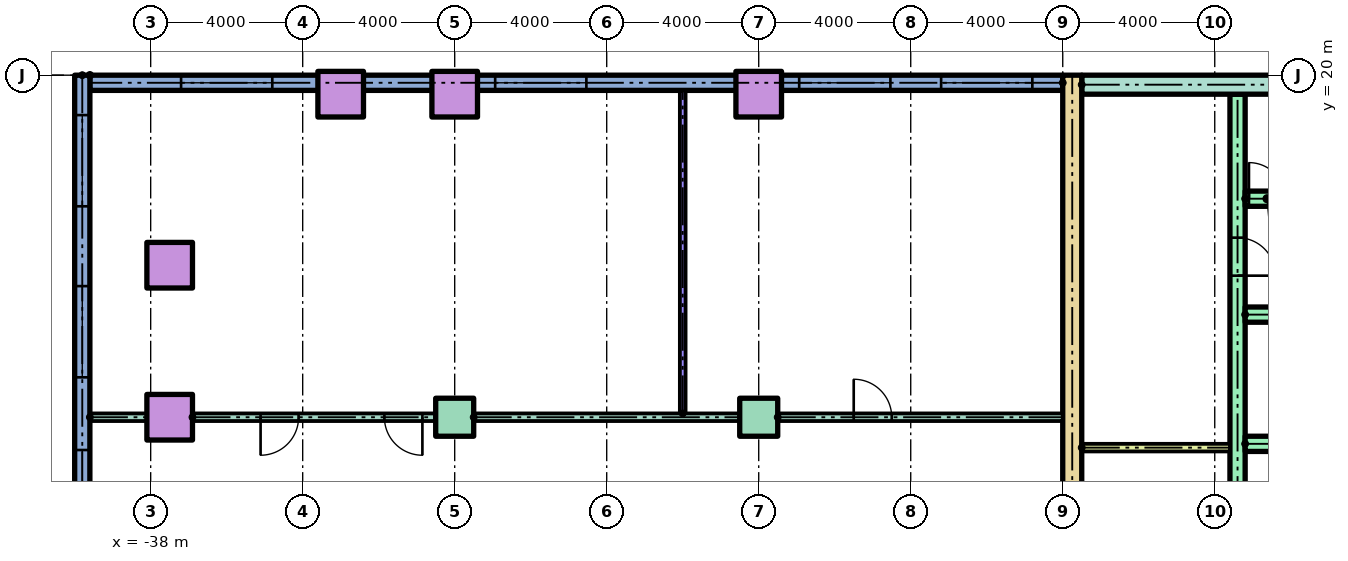
"""IFC4 building model, lengths in metres.
Left out: names, types, materials, properties, quantities, classifications, styles, units other than length and angle.
Written with IfcOpenShell. Run it as: python <this file> out.ifc"""

import sys

from ifc_helpers import new_model, si_unit, direction, frame, frame_2d, origin, origin_2d, place, context, subcontext, project, spatial, rectangle, hollow_rectangle, extrude, element, fill, save


model = new_model("IFC4")
c1 = context("Model", 3, precision=1e-05, world=origin(), true_north=direction((0.0, 1.0)))
c2 = subcontext(c1, "Body", "Model", "MODEL_VIEW")
j1 = project(units=[si_unit("LENGTHUNIT", "METRE"), si_unit("PLANEANGLEUNIT", "RADIAN")], contexts=[c1])
p1 = place(None, origin())
s1 = spatial("IfcSite", under=j1, at=p1, CompositionType="ELEMENT")
p2 = place(p1, origin())
s2 = spatial("IfcBuilding", under=s1, at=p2, CompositionType="ELEMENT")
p3 = place(p2, frame((0.0, 0.0, 6.0)))
s3 = spatial("IfcBuildingStorey", under=s2, at=p3, CompositionType="ELEMENT", Elevation=6.0)
p4 = place(p3, frame((-37.5, 11.0, 0.0)))
e1 = element("IfcColumn", 1, at=p4, inside=s3, PredefinedType="COLUMN", context=c2, shape_type="SweptSolid", body=[
    extrude(hollow_rectangle(XDim=1.2, YDim=1.2, WallThickness=0.06, at=origin_2d()), origin(), (0.0, 0.0, 1.0), 4.0),
])
for number, where in (
    (2, (-30.0, 11.0, 0.0)),
    (3, (-22.0, 11.0, 0.0)),
):
    element("IfcColumn", number, at=place(p3, frame(where)), inside=s3, PredefinedType="COLUMN", context=c2, shape_type="SweptSolid", body=[
        extrude(rectangle(XDim=1.0, YDim=1.0, at=origin_2d()), origin(), (0.0, 0.0, 1.0), 4.0),
    ])
for number, where in (
    (4, (-37.5, 15.0, 0.0)),
    (5, (-33.0, 19.5, 0.0)),
    (6, (-30.0, 19.5, 0.0)),
    (7, (-22.0, 19.5, 0.0)),
):
    element("IfcColumn", number, at=place(p3, frame(where)), inside=s3, PredefinedType="COLUMN", context=c2, shape_type="SweptSolid", body=[
        extrude(hollow_rectangle(XDim=1.2, YDim=1.2, WallThickness=0.06, at=origin_2d()), origin(), (0.0, 0.0, 1.0), 4.0),
    ])
p5 = place(p3, frame((-14.0, 19.8, 0.0), z_axis=(0.0, 0.0, 1.0), x_axis=(-1.0, 0.0, 0.0)))
e8 = element("IfcWall", 8, at=p5, inside=s3, PredefinedType="STANDARD", context=c2, shape_type="SweptSolid", body=[
    extrude(rectangle(XDim=25.6, YDim=0.4, at=frame_2d((12.8, 0.0))), origin(), (0.0, 0.0, 1.0), 3.7),
])
p6 = place(p5, frame((0.8, 0.0, 0.9)))
e9 = element("IfcOpeningElement", 9, at=p6, cuts=e8, PredefinedType="OPENING", context=c2, shape_type="SweptSolid", body=[
    extrude(rectangle(XDim=2.4, YDim=2.1, at=frame_2d((1.2, 1.05))), frame((0.0, 0.21, 0.0), z_axis=(0.0, -1.0, 0.0), x_axis=(1.0, 0.0, 0.0)), (0.0, 0.0, 1.0), 0.42),
])
p7 = place(p5, frame((4.535, 0.0, 0.9)))
e10 = element("IfcOpeningElement", 10, at=p7, cuts=e8, PredefinedType="OPENING", context=c2, shape_type="SweptSolid", body=[
    extrude(rectangle(XDim=2.4, YDim=2.1, at=frame_2d((1.2, 1.05))), frame((0.0, 0.21, 0.0), z_axis=(0.0, -1.0, 0.0), x_axis=(1.0, 0.0, 0.0)), (0.0, 0.0, 1.0), 0.42),
])
p8 = place(p5, frame((12.535, 0.0, 0.9)))
e11 = element("IfcOpeningElement", 11, at=p8, cuts=e8, PredefinedType="OPENING", context=c2, shape_type="SweptSolid", body=[
    extrude(rectangle(XDim=2.4, YDim=2.1, at=frame_2d((1.2, 1.05))), frame((0.0, 0.21, 0.0), z_axis=(0.0, -1.0, 0.0), x_axis=(1.0, 0.0, 0.0)), (0.0, 0.0, 1.0), 0.42),
])
p9 = place(p5, frame((20.8, 0.0, 0.9)))
e12 = element("IfcOpeningElement", 12, at=p9, cuts=e8, PredefinedType="OPENING", context=c2, shape_type="SweptSolid", body=[
    extrude(rectangle(XDim=2.4, YDim=2.1, at=frame_2d((1.2, 1.05))), frame((0.0, 0.21, 0.0), z_axis=(0.0, -1.0, 0.0), x_axis=(1.0, 0.0, 0.0)), (0.0, 0.0, 1.0), 0.42),
])
p10 = place(p3, frame((-39.8, 20.0, 0.0), z_axis=(0.0, 0.0, 1.0), x_axis=(0.0, -1.0, 0.0)))
e13 = element("IfcWall", 13, at=p10, inside=s3, PredefinedType="STANDARD", context=c2, shape_type="SweptSolid", body=[
    extrude(rectangle(XDim=70.0, YDim=0.4, at=frame_2d((35.0, 0.0))), origin(), (0.0, 0.0, 1.0), 3.7),
])
p11 = place(p10, frame((1.05, 0.0, 0.9)))
e14 = element("IfcOpeningElement", 14, at=p11, cuts=e13, PredefinedType="OPENING", context=c2, shape_type="SweptSolid", body=[
    extrude(rectangle(XDim=2.4, YDim=2.1, at=frame_2d((1.2, 1.05))), frame((0.0, 0.21, 0.0), z_axis=(0.0, -1.0, 0.0), x_axis=(1.0, 0.0, 0.0)), (0.0, 0.0, 1.0), 0.42),
])
p12 = place(p10, frame((5.55, 0.0, 0.9)))
e15 = element("IfcOpeningElement", 15, at=p12, cuts=e13, PredefinedType="OPENING", context=c2, shape_type="SweptSolid", body=[
    extrude(rectangle(XDim=2.4, YDim=2.1, at=frame_2d((1.2, 1.05))), frame((0.0, 0.21, 0.0), z_axis=(0.0, -1.0, 0.0), x_axis=(1.0, 0.0, 0.0)), (0.0, 0.0, 1.0), 0.42),
])
p13 = place(p10, frame((9.863, 0.0, 0.9)))
e16 = element("IfcOpeningElement", 16, at=p13, cuts=e13, PredefinedType="OPENING", context=c2, shape_type="SweptSolid", body=[
    extrude(rectangle(XDim=2.4, YDim=2.1, at=frame_2d((1.2, 1.05))), frame((0.0, 0.21, 0.0), z_axis=(0.0, -1.0, 0.0), x_axis=(1.0, 0.0, 0.0)), (0.0, 0.0, 1.0), 0.42),
])
p14 = place(p10, frame((13.988, 0.0, 0.9)))
e17 = element("IfcOpeningElement", 17, at=p14, cuts=e13, PredefinedType="OPENING", context=c2, shape_type="SweptSolid", body=[
    extrude(rectangle(XDim=2.4, YDim=2.1, at=frame_2d((1.2, 1.05))), frame((0.0, 0.21, 0.0), z_axis=(0.0, -1.0, 0.0), x_axis=(1.0, 0.0, 0.0)), (0.0, 0.0, 1.0), 0.42),
])
p15 = place(p10, frame((18.113, 0.0, 0.9)))
e18 = element("IfcOpeningElement", 18, at=p15, cuts=e13, PredefinedType="OPENING", context=c2, shape_type="SweptSolid", body=[
    extrude(rectangle(XDim=2.4, YDim=2.1, at=frame_2d((1.2, 1.05))), frame((0.0, 0.21, 0.0), z_axis=(0.0, -1.0, 0.0), x_axis=(1.0, 0.0, 0.0)), (0.0, 0.0, 1.0), 0.42),
])
p16 = place(p10, frame((22.238, 0.0, 0.9)))
e19 = element("IfcOpeningElement", 19, at=p16, cuts=e13, PredefinedType="OPENING", context=c2, shape_type="SweptSolid", body=[
    extrude(rectangle(XDim=2.4, YDim=2.1, at=frame_2d((1.2, 1.05))), frame((0.0, 0.21, 0.0), z_axis=(0.0, -1.0, 0.0), x_axis=(1.0, 0.0, 0.0)), (0.0, 0.0, 1.0), 0.42),
])
p17 = place(p10, frame((26.363, 0.0, 0.9)))
e20 = element("IfcOpeningElement", 20, at=p17, cuts=e13, PredefinedType="OPENING", context=c2, shape_type="SweptSolid", body=[
    extrude(rectangle(XDim=2.4, YDim=2.1, at=frame_2d((1.2, 1.05))), frame((0.0, 0.21, 0.0), z_axis=(0.0, -1.0, 0.0), x_axis=(1.0, 0.0, 0.0)), (0.0, 0.0, 1.0), 0.42),
])
p18 = place(p10, frame((30.488, 0.0, 0.9)))
e21 = element("IfcOpeningElement", 21, at=p18, cuts=e13, PredefinedType="OPENING", context=c2, shape_type="SweptSolid", body=[
    extrude(rectangle(XDim=2.4, YDim=2.1, at=frame_2d((1.2, 1.05))), frame((0.0, 0.21, 0.0), z_axis=(0.0, -1.0, 0.0), x_axis=(1.0, 0.0, 0.0)), (0.0, 0.0, 1.0), 0.42),
])
p19 = place(p10, frame((34.613, 0.0, 0.9)))
e22 = element("IfcOpeningElement", 22, at=p19, cuts=e13, PredefinedType="OPENING", context=c2, shape_type="SweptSolid", body=[
    extrude(rectangle(XDim=2.4, YDim=2.1, at=frame_2d((1.2, 1.05))), frame((0.0, 0.21, 0.0), z_axis=(0.0, -1.0, 0.0), x_axis=(1.0, 0.0, 0.0)), (0.0, 0.0, 1.0), 0.42),
])
p20 = place(p10, frame((38.738, 0.0, 0.9)))
e23 = element("IfcOpeningElement", 23, at=p20, cuts=e13, PredefinedType="OPENING", context=c2, shape_type="SweptSolid", body=[
    extrude(rectangle(XDim=2.4, YDim=2.1, at=frame_2d((1.2, 1.05))), frame((0.0, 0.21, 0.0), z_axis=(0.0, -1.0, 0.0), x_axis=(1.0, 0.0, 0.0)), (0.0, 0.0, 1.0), 0.42),
])
p21 = place(p10, frame((53.633, 0.0, 0.9)))
e24 = element("IfcOpeningElement", 24, at=p21, cuts=e13, PredefinedType="OPENING", context=c2, shape_type="SweptSolid", body=[
    extrude(rectangle(XDim=2.4, YDim=2.1, at=frame_2d((1.2, 1.05))), frame((0.0, 0.21, 0.0), z_axis=(0.0, -1.0, 0.0), x_axis=(1.0, 0.0, 0.0)), (0.0, 0.0, 1.0), 0.42),
])
p22 = place(p10, frame((57.3, 0.0, 0.9)))
e25 = element("IfcOpeningElement", 25, at=p22, cuts=e13, PredefinedType="OPENING", context=c2, shape_type="SweptSolid", body=[
    extrude(rectangle(XDim=2.4, YDim=2.1, at=frame_2d((1.2, 1.05))), frame((0.0, 0.21, 0.0), z_axis=(0.0, -1.0, 0.0), x_axis=(1.0, 0.0, 0.0)), (0.0, 0.0, 1.0), 0.42),
])
p23 = place(p10, frame((60.967, 0.0, 0.9)))
e26 = element("IfcOpeningElement", 26, at=p23, cuts=e13, PredefinedType="OPENING", context=c2, shape_type="SweptSolid", body=[
    extrude(rectangle(XDim=2.4, YDim=2.1, at=frame_2d((1.2, 1.05))), frame((0.0, 0.21, 0.0), z_axis=(0.0, -1.0, 0.0), x_axis=(1.0, 0.0, 0.0)), (0.0, 0.0, 1.0), 0.42),
])
p24 = place(p10, frame((66.85, 0.0, 0.9)))
e27 = element("IfcOpeningElement", 27, at=p24, cuts=e13, PredefinedType="OPENING", context=c2, shape_type="SweptSolid", body=[
    extrude(rectangle(XDim=2.4, YDim=2.1, at=frame_2d((1.2, 1.05))), frame((0.0, 0.21, 0.0), z_axis=(0.0, -1.0, 0.0), x_axis=(1.0, 0.0, 0.0)), (0.0, 0.0, 1.0), 0.42),
])
p25 = place(p3, frame((-13.75, 3.0, 0.0), z_axis=(0.0, 0.0, 1.0), x_axis=(0.0, 1.0, 0.0)))
e28 = element("IfcWall", 28, at=p25, inside=s3, PredefinedType="SHEAR", context=c2, shape_type="SweptSolid", body=[
    extrude(rectangle(XDim=17.0, YDim=0.5, at=frame_2d((8.5, 0.0))), origin(), (0.0, 0.0, 1.0), 3.7),
])
p26 = place(p3, frame((-13.5, 19.75, 0.0)))
e29 = element("IfcWall", 29, at=p26, inside=s3, PredefinedType="SHEAR", context=c2, shape_type="SweptSolid", body=[
    extrude(rectangle(XDim=27.0, YDim=0.5, at=frame_2d((13.5, 0.0))), origin(), (0.0, 0.0, 1.0), 3.7),
])
p27 = place(p3, frame((-9.4, 6.8, 0.0), z_axis=(0.0, 0.0, 1.0), x_axis=(0.0, 1.0, 0.0)))
e30 = element("IfcWall", 30, at=p27, inside=s3, PredefinedType="SHEAR", context=c2, shape_type="SweptSolid", body=[
    extrude(rectangle(XDim=12.7, YDim=0.4, at=frame_2d((6.35, 0.0))), origin(), (0.0, 0.0, 1.0), 3.7),
])
p28 = place(p27, frame((1.15, 0.0, 0.0)))
e31 = element("IfcOpeningElement", 31, at=p28, cuts=e30, PredefinedType="OPENING", context=c2, shape_type="SweptSolid", body=[
    extrude(rectangle(XDim=1.0, YDim=2.1, at=frame_2d((0.5, 1.05))), frame((0.0, 0.21, 0.0), z_axis=(0.0, -1.0, 0.0), x_axis=(1.0, 0.0, 0.0)), (0.0, 0.0, 1.0), 0.42),
])
p29 = place(p27, frame((7.925, 0.0, 0.0)))
e32 = element("IfcOpeningElement", 32, at=p29, cuts=e30, PredefinedType="OPENING", context=c2, shape_type="SweptSolid", body=[
    extrude(rectangle(XDim=1.0, YDim=2.1, at=frame_2d((0.5, 1.05))), frame((0.0, 0.21, 0.0), z_axis=(0.0, -1.0, 0.0), x_axis=(1.0, 0.0, 0.0)), (0.0, 0.0, 1.0), 0.42),
])
p30 = place(p3, frame((-9.2, 10.3, 0.0)))
e33 = element("IfcWall", 33, at=p30, inside=s3, PredefinedType="SHEAR", context=c2, shape_type="SweptSolid", body=[
    extrude(rectangle(XDim=8.0, YDim=0.4, at=frame_2d((4.0, 0.0))), origin(), (0.0, 0.0, 1.0), 3.7),
])
p31 = place(p30, frame((2.033, 0.0, 0.0)))
e34 = element("IfcOpeningElement", 34, at=p31, cuts=e33, PredefinedType="OPENING", context=c2, shape_type="SweptSolid", body=[
    extrude(rectangle(XDim=1.0, YDim=2.1, at=frame_2d((0.5, 1.05))), frame((0.0, 0.21, 0.0), z_axis=(0.0, -1.0, 0.0), x_axis=(1.0, 0.0, 0.0)), (0.0, 0.0, 1.0), 0.42),
])
p32 = place(p30, frame((6.133, 0.0, 0.0)))
e35 = element("IfcOpeningElement", 35, at=p32, cuts=e33, PredefinedType="OPENING", context=c2, shape_type="SweptSolid", body=[
    extrude(rectangle(XDim=1.0, YDim=2.1, at=frame_2d((0.5, 1.05))), frame((0.0, 0.21, 0.0), z_axis=(0.0, -1.0, 0.0), x_axis=(1.0, 0.0, 0.0)), (0.0, 0.0, 1.0), 0.42),
])
p33 = place(p3, frame((-9.2, 13.7, 0.0)))
e36 = element("IfcWall", 36, at=p33, inside=s3, PredefinedType="SHEAR", context=c2, shape_type="SweptSolid", body=[
    extrude(rectangle(XDim=8.0, YDim=0.4, at=frame_2d((4.0, 0.0))), origin(), (0.0, 0.0, 1.0), 3.7),
])
p34 = place(p3, frame((-9.2, 16.75, 0.0)))
e37 = element("IfcWall", 37, at=p34, inside=s3, PredefinedType="SHEAR", context=c2, shape_type="SweptSolid", body=[
    extrude(rectangle(XDim=18.4, YDim=0.4, at=frame_2d((9.2, 0.0))), origin(), (0.0, 0.0, 1.0), 3.7),
])
p35 = place(p34, frame((0.1, 0.0, 0.0)))
e38 = element("IfcOpeningElement", 38, at=p35, cuts=e37, PredefinedType="OPENING", context=c2, shape_type="SweptSolid", body=[
    extrude(rectangle(XDim=0.95, YDim=2.1, at=frame_2d((0.475, 1.05))), frame((0.0, 0.21, 0.0), z_axis=(0.0, -1.0, 0.0), x_axis=(1.0, 0.0, 0.0)), (0.0, 0.0, 1.0), 0.42),
])
p36 = place(p34, frame((6.1, 0.0, 0.0)))
e39 = element("IfcOpeningElement", 39, at=p36, cuts=e37, PredefinedType="OPENING", context=c2, shape_type="SweptSolid", body=[
    extrude(rectangle(XDim=0.95, YDim=2.1, at=frame_2d((0.475, 1.05))), frame((0.0, 0.21, 0.0), z_axis=(0.0, -1.0, 0.0), x_axis=(1.0, 0.0, 0.0)), (0.0, 0.0, 1.0), 0.42),
])
p37 = place(p34, frame((12.1, 0.0, 0.0)))
e40 = element("IfcOpeningElement", 40, at=p37, cuts=e37, PredefinedType="OPENING", context=c2, shape_type="SweptSolid", body=[
    extrude(rectangle(XDim=0.95, YDim=2.1, at=frame_2d((0.475, 1.05))), frame((0.0, 0.21, 0.0), z_axis=(0.0, -1.0, 0.0), x_axis=(1.0, 0.0, 0.0)), (0.0, 0.0, 1.0), 0.42),
])
p38 = place(p3, frame((-13.5, 10.2, 0.0)))
e41 = element("IfcWall", 41, at=p38, inside=s3, PredefinedType="PARTITIONING", context=c2, shape_type="SweptSolid", body=[
    extrude(rectangle(XDim=3.9, YDim=0.2, at=frame_2d((1.95, 0.0))), origin(), (0.0, 0.0, 1.0), 3.7),
])
p39 = place(p3, frame((-39.6, 11.0, 0.0)))
e42 = element("IfcWall", 42, at=p39, inside=s3, PredefinedType="PARTITIONING", context=c2, shape_type="SweptSolid", body=[
    extrude(rectangle(XDim=1.5, YDim=0.2, at=frame_2d((0.75, 0.0))), origin(), (0.0, 0.0, 1.0), 3.7),
])
p40 = place(p3, frame((-36.9, 11.0, 0.0)))
e43 = element("IfcWall", 43, at=p40, inside=s3, PredefinedType="PARTITIONING", context=c2, shape_type="SweptSolid", body=[
    extrude(rectangle(XDim=6.4, YDim=0.2, at=frame_2d((3.2, 0.0))), origin(), (0.0, 0.0, 1.0), 3.7),
])
p41 = place(p40, frame((1.792, 0.0, 0.0)))
e44 = element("IfcOpeningElement", 44, at=p41, cuts=e43, PredefinedType="OPENING", context=c2, shape_type="SweptSolid", body=[
    extrude(rectangle(XDim=1.0, YDim=2.1, at=frame_2d((0.5, 1.05))), frame((0.0, 0.11, 0.0), z_axis=(0.0, -1.0, 0.0), x_axis=(1.0, 0.0, 0.0)), (0.0, 0.0, 1.0), 0.22),
])
p42 = place(p40, frame((5.05, 0.0, 0.0)))
e45 = element("IfcOpeningElement", 45, at=p42, cuts=e43, PredefinedType="OPENING", context=c2, shape_type="SweptSolid", body=[
    extrude(rectangle(XDim=1.0, YDim=2.1, at=frame_2d((0.5, 1.05))), frame((0.0, 0.11, 0.0), z_axis=(0.0, -1.0, 0.0), x_axis=(1.0, 0.0, 0.0)), (0.0, 0.0, 1.0), 0.22),
])
p43 = place(p3, frame((-29.5, 11.0, 0.0)))
e46 = element("IfcWall", 46, at=p43, inside=s3, PredefinedType="PARTITIONING", context=c2, shape_type="SweptSolid", body=[
    extrude(rectangle(XDim=7.0, YDim=0.2, at=frame_2d((3.5, 0.0))), origin(), (0.0, 0.0, 1.0), 3.7),
])
p44 = place(p3, frame((-21.5, 11.0, 0.0)))
e47 = element("IfcWall", 47, at=p44, inside=s3, PredefinedType="PARTITIONING", context=c2, shape_type="SweptSolid", body=[
    extrude(rectangle(XDim=7.5, YDim=0.2, at=frame_2d((3.75, 0.0))), origin(), (0.0, 0.0, 1.0), 3.7),
])
p45 = place(p44, frame((2.0, 0.0, 0.0)))
e48 = element("IfcOpeningElement", 48, at=p45, cuts=e47, PredefinedType="OPENING", context=c2, shape_type="SweptSolid", body=[
    extrude(rectangle(XDim=1.0, YDim=2.1, at=frame_2d((0.5, 1.05))), frame((0.0, 0.11, 0.0), z_axis=(0.0, -1.0, 0.0), x_axis=(1.0, 0.0, 0.0)), (0.0, 0.0, 1.0), 0.22),
])
p46 = place(p3, frame((-24.0, 11.1, 0.0), z_axis=(0.0, 0.0, 1.0), x_axis=(0.0, 1.0, 0.0)))
e49 = element("IfcWall", 49, at=p46, inside=s3, PredefinedType="PARTITIONING", context=c2, shape_type="SweptSolid", body=[
    extrude(rectangle(XDim=8.5, YDim=0.15, at=frame_2d((4.25, 0.0))), origin(), (0.0, 0.0, 1.0), 3.7),
])
p47 = place(p6, origin())
e50 = element("IfcWindow", 50, at=p47, inside=s3, PartitioningType="SINGLE_PANEL", PredefinedType="WINDOW", context=c2, shape_type="SweptSolid", body=[
    extrude(rectangle(XDim=2.4, YDim=2.1, at=frame_2d((1.2, 1.05))), frame((0.0, 0.03, 0.0), z_axis=(0.0, -1.0, 0.0), x_axis=(1.0, 0.0, 0.0)), (0.0, 0.0, 1.0), 0.06),
])
fill(e9, e50)
p48 = place(p7, origin())
e51 = element("IfcWindow", 51, at=p48, inside=s3, PartitioningType="SINGLE_PANEL", PredefinedType="WINDOW", context=c2, shape_type="SweptSolid", body=[
    extrude(rectangle(XDim=2.4, YDim=2.1, at=frame_2d((1.2, 1.05))), frame((0.0, 0.03, 0.0), z_axis=(0.0, -1.0, 0.0), x_axis=(1.0, 0.0, 0.0)), (0.0, 0.0, 1.0), 0.06),
])
fill(e10, e51)
p49 = place(p8, origin())
e52 = element("IfcWindow", 52, at=p49, inside=s3, PartitioningType="SINGLE_PANEL", PredefinedType="WINDOW", context=c2, shape_type="SweptSolid", body=[
    extrude(rectangle(XDim=2.4, YDim=2.1, at=frame_2d((1.2, 1.05))), frame((0.0, 0.03, 0.0), z_axis=(0.0, -1.0, 0.0), x_axis=(1.0, 0.0, 0.0)), (0.0, 0.0, 1.0), 0.06),
])
fill(e11, e52)
p50 = place(p9, origin())
e53 = element("IfcWindow", 53, at=p50, inside=s3, PartitioningType="SINGLE_PANEL", PredefinedType="WINDOW", context=c2, shape_type="SweptSolid", body=[
    extrude(rectangle(XDim=2.4, YDim=2.1, at=frame_2d((1.2, 1.05))), frame((0.0, 0.03, 0.0), z_axis=(0.0, -1.0, 0.0), x_axis=(1.0, 0.0, 0.0)), (0.0, 0.0, 1.0), 0.06),
])
fill(e12, e53)
p51 = place(p11, origin())
e54 = element("IfcWindow", 54, at=p51, inside=s3, PartitioningType="SINGLE_PANEL", PredefinedType="WINDOW", context=c2, shape_type="SweptSolid", body=[
    extrude(rectangle(XDim=2.4, YDim=2.1, at=frame_2d((1.2, 1.05))), frame((0.0, 0.03, 0.0), z_axis=(0.0, -1.0, 0.0), x_axis=(1.0, 0.0, 0.0)), (0.0, 0.0, 1.0), 0.06),
])
fill(e14, e54)
p52 = place(p12, origin())
e55 = element("IfcWindow", 55, at=p52, inside=s3, PartitioningType="SINGLE_PANEL", PredefinedType="WINDOW", context=c2, shape_type="SweptSolid", body=[
    extrude(rectangle(XDim=2.4, YDim=2.1, at=frame_2d((1.2, 1.05))), frame((0.0, 0.03, 0.0), z_axis=(0.0, -1.0, 0.0), x_axis=(1.0, 0.0, 0.0)), (0.0, 0.0, 1.0), 0.06),
])
fill(e15, e55)
p53 = place(p13, origin())
e56 = element("IfcWindow", 56, at=p53, inside=s3, PartitioningType="SINGLE_PANEL", PredefinedType="WINDOW", context=c2, shape_type="SweptSolid", body=[
    extrude(rectangle(XDim=2.4, YDim=2.1, at=frame_2d((1.2, 1.05))), frame((0.0, 0.03, 0.0), z_axis=(0.0, -1.0, 0.0), x_axis=(1.0, 0.0, 0.0)), (0.0, 0.0, 1.0), 0.06),
])
fill(e16, e56)
p54 = place(p35, origin())
e57 = element("IfcDoor", 57, at=p54, inside=s3, OperationType="SINGLE_SWING_LEFT", PredefinedType="DOOR", context=c2, shape_type="SweptSolid", body=[
    extrude(rectangle(XDim=0.95, YDim=2.1, at=frame_2d((0.475, 1.05))), frame((0.0, 0.025, 0.0), z_axis=(0.0, -1.0, 0.0), x_axis=(1.0, 0.0, 0.0)), (0.0, 0.0, 1.0), 0.05),
])
fill(e38, e57)
p55 = place(p29, frame((1.0, 0.0, 0.0), z_axis=(0.0, 0.0, 1.0), x_axis=(-1.0, 0.0, 0.0)))
e58 = element("IfcDoor", 58, at=p55, inside=s3, OperationType="SINGLE_SWING_LEFT", PredefinedType="DOOR", context=c2, shape_type="SweptSolid", body=[
    extrude(rectangle(XDim=1.0, YDim=2.1, at=frame_2d((0.5, 1.05))), frame((0.0, 0.025, 0.0), z_axis=(0.0, -1.0, 0.0), x_axis=(1.0, 0.0, 0.0)), (0.0, 0.0, 1.0), 0.05),
])
fill(e32, e58)
p56 = place(p41, frame((1.0, 0.0, 0.0), z_axis=(0.0, 0.0, 1.0), x_axis=(-1.0, 0.0, 0.0)))
e59 = element("IfcDoor", 59, at=p56, inside=s3, OperationType="SINGLE_SWING_LEFT", PredefinedType="DOOR", context=c2, shape_type="SweptSolid", body=[
    extrude(rectangle(XDim=1.0, YDim=2.1, at=frame_2d((0.5, 1.05))), frame((0.0, 0.025, 0.0), z_axis=(0.0, -1.0, 0.0), x_axis=(1.0, 0.0, 0.0)), (0.0, 0.0, 1.0), 0.05),
])
fill(e44, e59)
p57 = place(p42, frame((1.0, 0.0, 0.0), z_axis=(0.0, 0.0, 1.0), x_axis=(-1.0, 0.0, 0.0)))
e60 = element("IfcDoor", 60, at=p57, inside=s3, OperationType="SINGLE_SWING_RIGHT", PredefinedType="DOOR", context=c2, shape_type="SweptSolid", body=[
    extrude(rectangle(XDim=1.0, YDim=2.1, at=frame_2d((0.5, 1.05))), frame((0.0, 0.025, 0.0), z_axis=(0.0, -1.0, 0.0), x_axis=(1.0, 0.0, 0.0)), (0.0, 0.0, 1.0), 0.05),
])
fill(e45, e60)
p58 = place(p45, origin())
e61 = element("IfcDoor", 61, at=p58, inside=s3, OperationType="SINGLE_SWING_LEFT", PredefinedType="DOOR", context=c2, shape_type="SweptSolid", body=[
    extrude(rectangle(XDim=1.0, YDim=2.1, at=frame_2d((0.5, 1.05))), frame((0.0, 0.025, 0.0), z_axis=(0.0, -1.0, 0.0), x_axis=(1.0, 0.0, 0.0)), (0.0, 0.0, 1.0), 0.05),
])
fill(e48, e61)
save(model, sys.argv[1])
